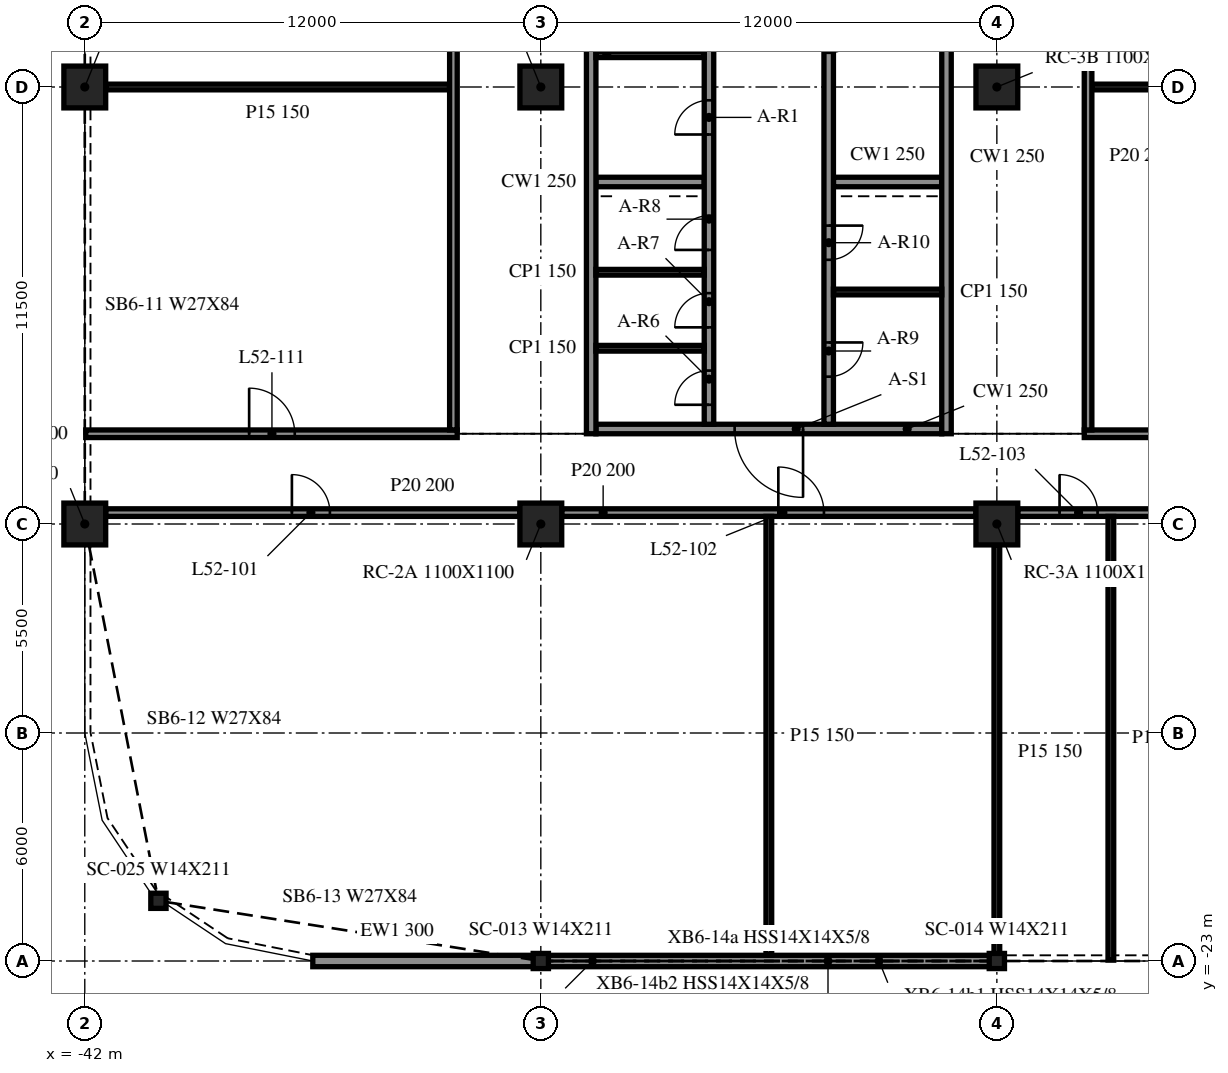
"""IFC4 building model, lengths in metres.
Left out: names, types, materials, properties, quantities, classifications, styles, units other than length and angle.
Written with IfcOpenShell. Run it as: python <this file> out.ifc"""

import sys

from ifc_helpers import new_model, si_unit, direction, frame, frame_2d, origin, origin_2d, place, context, subcontext, project, spatial, rectangle, i_section, extrude, element, fill, save


model = new_model("IFC4")
c1 = context("Model", 3, precision=1e-05, world=origin(), true_north=direction((0.0, 1.0)))
c2 = subcontext(c1, "Body", "Model", "MODEL_VIEW")
j1 = project(units=[si_unit("LENGTHUNIT", "METRE"), si_unit("PLANEANGLEUNIT", "RADIAN")], contexts=[c1])
p1 = place(None, origin())
s1 = spatial("IfcSite", under=j1, at=p1, CompositionType="ELEMENT")
p2 = place(p1, origin())
s2 = spatial("IfcBuilding", under=s1, at=p2, CompositionType="ELEMENT")
p3 = place(p2, frame((0.0, 0.0, 216.7)))
s3 = spatial("IfcBuildingStorey", under=s2, at=p3, CompositionType="ELEMENT", Elevation=216.7)
for number, where, z_axis, x_axis in (
    (1, (-42.0, -11.5, -0.34), (0.0, 0.0, 1.0), (1.0, 0.0, 0.0)),
    (2, (-42.0, 0.0, -0.34), (0.0, 0.0, 1.0), (1.0, 0.0, 0.0)),
    (3, (-30.0, -11.5, -0.34), (0.0, 0.0, 1.0), (1.0, 0.0, 0.0)),
    (4, (-30.0, 0.0, -0.34), (0.0, 0.0, 1.0), (1.0, 0.0, 0.0)),
    (5, (-18.0, -11.5, -0.34), (0.0, 0.0, 1.0), (1.0, 0.0, 0.0)),
    (6, (-18.0, 0.0, -0.34), (0.0, 0.0, 1.0), (1.0, 0.0, 0.0)),
):
    element("IfcColumn", number, at=place(p3, frame(where, z_axis=z_axis, x_axis=x_axis)), inside=s3, PredefinedType="COLUMN", context=c2, shape_type="SweptSolid", body=[
        extrude(rectangle(XDim=1.1, YDim=1.1, at=origin_2d()), origin(), (0.0, 0.0, 1.0), 3.8),
    ])
for number, where, z_axis, x_axis in (
    (7, (-40.062, -21.416, -0.34), (0.0, 0.0, 1.0), (1.0, 0.0, 0.0)),
    (8, (-30.0, -23.0, -0.34), (0.0, 0.0, 1.0), (1.0, 0.0, 0.0)),
    (9, (-18.0, -23.0, -0.34), (0.0, 0.0, 1.0), (1.0, 0.0, 0.0)),
):
    element("IfcColumn", number, at=place(p3, frame(where, z_axis=z_axis, x_axis=x_axis)), inside=s3, PredefinedType="COLUMN", context=c2, shape_type="SweptSolid", body=[
        extrude(i_section(OverallWidth=0.401, OverallDepth=0.399, WebThickness=0.025, FlangeThickness=0.04, at=origin_2d()), origin(), (0.0, 0.0, 1.0), 3.8),
    ])
p4 = place(p3, frame((-36.0, -23.0, 0.0), z_axis=(0.0, 0.0, 1.0), x_axis=(1.0, 0.0, 0.0)))
e10 = element("IfcWall", 10, at=p4, inside=s3, PredefinedType="NOTDEFINED", context=c2, shape_type="SweptSolid", body=[
    extrude(rectangle(XDim=5.988, YDim=0.3, at=frame_2d((2.994, 0.0))), origin(), (0.0, 0.0, 1.0), 2.782),
])
p5 = place(p3, frame((-29.988, -23.0, 0.0), z_axis=(0.0, 0.0, 1.0), x_axis=(1.0, 0.0, 0.0)))
e11 = element("IfcWall", 11, at=p5, inside=s3, PredefinedType="NOTDEFINED", context=c2, shape_type="SweptSolid", body=[
    extrude(rectangle(XDim=11.975, YDim=0.3, at=frame_2d((5.988, 0.0))), origin(), (0.0, 0.0, 1.0), 2.782),
])
for number, where, z_axis, x_axis in (
    (12, (-28.675, 15.125, 0.0), (0.0, 0.0, 1.0), (0.0, -1.0, 0.0)),
    (13, (-19.325, -9.125, 0.0), (0.0, 0.0, 1.0), (0.0, 1.0, 0.0)),
):
    element("IfcWall", number, at=place(p3, frame(where, z_axis=z_axis, x_axis=x_axis)), inside=s3, PredefinedType="SOLIDWALL", context=c2, shape_type="SweptSolid", body=[
        extrude(rectangle(XDim=24.25, YDim=0.25, at=frame_2d((12.125, 0.0))), origin(), (0.0, 0.0, 1.0), 3.46),
    ])
p6 = place(p3, frame((-19.45, -9.0, 0.0), z_axis=(0.0, 0.0, 1.0), x_axis=(-1.0, 0.0, 0.0)))
e14 = element("IfcWall", 14, at=p6, inside=s3, PredefinedType="SOLIDWALL", context=c2, shape_type="SweptSolid", body=[
    extrude(rectangle(XDim=9.1, YDim=0.25, at=frame_2d((4.55, 0.0))), origin(), (0.0, 0.0, 1.0), 3.46),
])
p7 = place(p6, frame((3.65, 0.0, 0.0)))
e15 = element("IfcOpeningElement", 15, at=p7, cuts=e14, PredefinedType="OPENING", context=c2, shape_type="SweptSolid", body=[
    extrude(rectangle(XDim=1.8, YDim=2.1, at=frame_2d((0.9, 1.05))), frame((0.0, 0.135, 0.0), z_axis=(0.0, -1.0, 0.0), x_axis=(1.0, 0.0, 0.0)), (0.0, 0.0, 1.0), 0.27),
])
p8 = place(p3, frame((-25.575, -8.875, 0.0), z_axis=(0.0, 0.0, 1.0), x_axis=(0.0, 1.0, 0.0)))
e16 = element("IfcWall", 16, at=p8, inside=s3, PredefinedType="SOLIDWALL", context=c2, shape_type="SweptSolid", body=[
    extrude(rectangle(XDim=17.5, YDim=0.25, at=frame_2d((8.75, 0.0))), origin(), (0.0, 0.0, 1.0), 3.46),
])
p9 = place(p8, frame((7.625, 0.0, 0.0)))
e17 = element("IfcOpeningElement", 17, at=p9, cuts=e16, PredefinedType="OPENING", context=c2, shape_type="SweptSolid", body=[
    extrude(rectangle(XDim=0.9, YDim=2.1, at=frame_2d((0.45, 1.05))), frame((0.0, 0.135, 0.0), z_axis=(0.0, -1.0, 0.0), x_axis=(1.0, 0.0, 0.0)), (0.0, 0.0, 1.0), 0.27),
])
p10 = place(p8, frame((11.425, 0.0, 0.0)))
e18 = element("IfcOpeningElement", 18, at=p10, cuts=e16, PredefinedType="OPENING", context=c2, shape_type="SweptSolid", body=[
    extrude(rectangle(XDim=0.9, YDim=2.1, at=frame_2d((0.45, 1.05))), frame((0.0, 0.135, 0.0), z_axis=(0.0, -1.0, 0.0), x_axis=(1.0, 0.0, 0.0)), (0.0, 0.0, 1.0), 0.27),
])
p11 = place(p8, frame((15.225, 0.0, 0.0)))
e19 = element("IfcOpeningElement", 19, at=p11, cuts=e16, PredefinedType="OPENING", context=c2, shape_type="SweptSolid", body=[
    extrude(rectangle(XDim=0.9, YDim=2.1, at=frame_2d((0.45, 1.05))), frame((0.0, 0.135, 0.0), z_axis=(0.0, -1.0, 0.0), x_axis=(1.0, 0.0, 0.0)), (0.0, 0.0, 1.0), 0.27),
])
p12 = place(p8, frame((0.512, 0.0, 0.0)))
e20 = element("IfcOpeningElement", 20, at=p12, cuts=e16, PredefinedType="OPENING", context=c2, shape_type="SweptSolid", body=[
    extrude(rectangle(XDim=0.9, YDim=2.1, at=frame_2d((0.45, 1.05))), frame((0.0, 0.135, 0.0), z_axis=(0.0, -1.0, 0.0), x_axis=(1.0, 0.0, 0.0)), (0.0, 0.0, 1.0), 0.27),
])
p13 = place(p8, frame((2.55, 0.0, 0.0)))
e21 = element("IfcOpeningElement", 21, at=p13, cuts=e16, PredefinedType="OPENING", context=c2, shape_type="SweptSolid", body=[
    extrude(rectangle(XDim=0.9, YDim=2.1, at=frame_2d((0.45, 1.05))), frame((0.0, 0.135, 0.0), z_axis=(0.0, -1.0, 0.0), x_axis=(1.0, 0.0, 0.0)), (0.0, 0.0, 1.0), 0.27),
])
p14 = place(p8, frame((4.587, 0.0, 0.0)))
e22 = element("IfcOpeningElement", 22, at=p14, cuts=e16, PredefinedType="OPENING", context=c2, shape_type="SweptSolid", body=[
    extrude(rectangle(XDim=0.9, YDim=2.1, at=frame_2d((0.45, 1.05))), frame((0.0, 0.135, 0.0), z_axis=(0.0, -1.0, 0.0), x_axis=(1.0, 0.0, 0.0)), (0.0, 0.0, 1.0), 0.27),
])
p15 = place(p3, frame((-22.425, 14.875, 0.0), z_axis=(0.0, 0.0, 1.0), x_axis=(0.0, -1.0, 0.0)))
e23 = element("IfcWall", 23, at=p15, inside=s3, PredefinedType="SOLIDWALL", context=c2, shape_type="SweptSolid", body=[
    extrude(rectangle(XDim=23.75, YDim=0.25, at=frame_2d((11.875, 0.0))), origin(), (0.0, 0.0, 1.0), 3.46),
])
p16 = place(p15, frame((13.075, 0.0, 0.0)))
e24 = element("IfcOpeningElement", 24, at=p16, cuts=e23, PredefinedType="OPENING", context=c2, shape_type="SweptSolid", body=[
    extrude(rectangle(XDim=0.9, YDim=2.1, at=frame_2d((0.45, 1.05))), frame((0.0, 0.135, 0.0), z_axis=(0.0, -1.0, 0.0), x_axis=(1.0, 0.0, 0.0)), (0.0, 0.0, 1.0), 0.27),
])
p17 = place(p15, frame((7.625, 0.0, 0.0)))
e25 = element("IfcOpeningElement", 25, at=p17, cuts=e23, PredefinedType="OPENING", context=c2, shape_type="SweptSolid", body=[
    extrude(rectangle(XDim=0.9, YDim=2.1, at=frame_2d((0.45, 1.05))), frame((0.0, 0.135, 0.0), z_axis=(0.0, -1.0, 0.0), x_axis=(1.0, 0.0, 0.0)), (0.0, 0.0, 1.0), 0.27),
])
p18 = place(p15, frame((21.597, 0.0, 0.0)))
e26 = element("IfcOpeningElement", 26, at=p18, cuts=e23, PredefinedType="OPENING", context=c2, shape_type="SweptSolid", body=[
    extrude(rectangle(XDim=0.9, YDim=2.1, at=frame_2d((0.45, 1.05))), frame((0.0, 0.135, 0.0), z_axis=(0.0, -1.0, 0.0), x_axis=(1.0, 0.0, 0.0)), (0.0, 0.0, 1.0), 0.27),
])
p19 = place(p15, frame((18.522, 0.0, 0.0)))
e27 = element("IfcOpeningElement", 27, at=p19, cuts=e23, PredefinedType="OPENING", context=c2, shape_type="SweptSolid", body=[
    extrude(rectangle(XDim=0.9, YDim=2.1, at=frame_2d((0.45, 1.05))), frame((0.0, 0.135, 0.0), z_axis=(0.0, -1.0, 0.0), x_axis=(1.0, 0.0, 0.0)), (0.0, 0.0, 1.0), 0.27),
])
p20 = place(p15, frame((4.087, 0.0, 0.0)))
e28 = element("IfcOpeningElement", 28, at=p20, cuts=e23, PredefinedType="OPENING", context=c2, shape_type="SweptSolid", body=[
    extrude(rectangle(XDim=0.9, YDim=2.1, at=frame_2d((0.45, 1.05))), frame((0.0, 0.135, 0.0), z_axis=(0.0, -1.0, 0.0), x_axis=(1.0, 0.0, 0.0)), (0.0, 0.0, 1.0), 0.27),
])
p21 = place(p15, frame((1.012, 0.0, 0.0)))
e29 = element("IfcOpeningElement", 29, at=p21, cuts=e23, PredefinedType="OPENING", context=c2, shape_type="SweptSolid", body=[
    extrude(rectangle(XDim=0.9, YDim=2.1, at=frame_2d((0.45, 1.05))), frame((0.0, 0.135, 0.0), z_axis=(0.0, -1.0, 0.0), x_axis=(1.0, 0.0, 0.0)), (0.0, 0.0, 1.0), 0.27),
])
for number, where, z_axis, x_axis in (
    (30, (-28.55, -2.5, 0.0), (0.0, 0.0, 1.0), (1.0, 0.0, 0.0)),
    (31, (-22.3, -2.5, 0.0), (0.0, 0.0, 1.0), (1.0, 0.0, 0.0)),
):
    element("IfcWall", number, at=place(p3, frame(where, z_axis=z_axis, x_axis=x_axis)), inside=s3, PredefinedType="SOLIDWALL", context=c2, shape_type="SweptSolid", body=[
        extrude(rectangle(XDim=2.85, YDim=0.25, at=frame_2d((1.425, 0.0))), origin(), (0.0, 0.0, 1.0), 3.46),
    ])
for number, where, z_axis, x_axis in (
    (32, (-28.55, 0.85, 0.0), (0.0, 0.0, 1.0), (1.0, 0.0, 0.0)),
    (33, (-28.55, -6.875, 0.0), (0.0, 0.0, 1.0), (1.0, 0.0, 0.0)),
    (34, (-28.55, -4.875, 0.0), (0.0, 0.0, 1.0), (1.0, 0.0, 0.0)),
    (35, (-22.3, -5.395, 0.0), (0.0, 0.0, 1.0), (1.0, 0.0, 0.0)),
):
    element("IfcWall", number, at=place(p3, frame(where, z_axis=z_axis, x_axis=x_axis)), inside=s3, PredefinedType="PARTITIONING", context=c2, shape_type="SweptSolid", body=[
        extrude(rectangle(XDim=2.85, YDim=0.15, at=frame_2d((1.425, 0.0))), origin(), (0.0, 0.0, 1.0), 3.46),
    ])
p22 = place(p3, frame((-41.45, -11.2, 0.0), z_axis=(0.0, 0.0, 1.0), x_axis=(1.0, 0.0, 0.0)))
e36 = element("IfcWall", 36, at=p22, inside=s3, PredefinedType="PARTITIONING", context=c2, shape_type="SweptSolid", body=[
    extrude(rectangle(XDim=10.9, YDim=0.2, at=frame_2d((5.45, 0.0))), origin(), (0.0, 0.0, 1.0), 3.46),
])
p23 = place(p22, frame((4.9, 0.0, 0.0)))
e37 = element("IfcOpeningElement", 37, at=p23, cuts=e36, PredefinedType="OPENING", context=c2, shape_type="SweptSolid", body=[
    extrude(rectangle(XDim=1.0, YDim=2.1, at=frame_2d((0.5, 1.05))), frame((0.0, 0.11, 0.0), z_axis=(0.0, -1.0, 0.0), x_axis=(1.0, 0.0, 0.0)), (0.0, 0.0, 1.0), 0.22),
])
p24 = place(p3, frame((-29.45, -11.2, 0.0), z_axis=(0.0, 0.0, 1.0), x_axis=(1.0, 0.0, 0.0)))
e38 = element("IfcWall", 38, at=p24, inside=s3, PredefinedType="PARTITIONING", context=c2, shape_type="SweptSolid", body=[
    extrude(rectangle(XDim=10.9, YDim=0.2, at=frame_2d((5.45, 0.0))), origin(), (0.0, 0.0, 1.0), 3.46),
])
p25 = place(p24, frame((5.7, 0.0, 0.0)))
e39 = element("IfcOpeningElement", 39, at=p25, cuts=e38, PredefinedType="OPENING", context=c2, shape_type="SweptSolid", body=[
    extrude(rectangle(XDim=1.2, YDim=2.1, at=frame_2d((0.6, 1.05))), frame((0.0, 0.11, 0.0), z_axis=(0.0, -1.0, 0.0), x_axis=(1.0, 0.0, 0.0)), (0.0, 0.0, 1.0), 0.22),
])
p26 = place(p3, frame((-17.45, -11.2, 0.0), z_axis=(0.0, 0.0, 1.0), x_axis=(1.0, 0.0, 0.0)))
e40 = element("IfcWall", 40, at=p26, inside=s3, PredefinedType="PARTITIONING", context=c2, shape_type="SweptSolid", body=[
    extrude(rectangle(XDim=10.9, YDim=0.2, at=frame_2d((5.45, 0.0))), origin(), (0.0, 0.0, 1.0), 3.46),
])
p27 = place(p26, frame((1.1, 0.0, 0.0)))
e41 = element("IfcOpeningElement", 41, at=p27, cuts=e40, PredefinedType="OPENING", context=c2, shape_type="SweptSolid", body=[
    extrude(rectangle(XDim=1.0, YDim=2.1, at=frame_2d((0.5, 1.05))), frame((0.0, 0.11, 0.0), z_axis=(0.0, -1.0, 0.0), x_axis=(1.0, 0.0, 0.0)), (0.0, 0.0, 1.0), 0.22),
])
p28 = place(p26, frame((4.9, 0.0, 0.0)))
e42 = element("IfcOpeningElement", 42, at=p28, cuts=e40, PredefinedType="OPENING", context=c2, shape_type="SweptSolid", body=[
    extrude(rectangle(XDim=1.0, YDim=2.1, at=frame_2d((0.5, 1.05))), frame((0.0, 0.11, 0.0), z_axis=(0.0, -1.0, 0.0), x_axis=(1.0, 0.0, 0.0)), (0.0, 0.0, 1.0), 0.22),
])
p29 = place(p3, frame((-41.975, -9.125, 0.0), z_axis=(0.0, 0.0, 1.0), x_axis=(1.0, 0.0, 0.0)))
e43 = element("IfcWall", 43, at=p29, inside=s3, PredefinedType="PARTITIONING", context=c2, shape_type="SweptSolid", body=[
    extrude(rectangle(XDim=9.775, YDim=0.2, at=frame_2d((4.888, 0.0))), origin(), (0.0, 0.0, 1.0), 3.46),
])
p30 = place(p29, frame((4.3, 0.0, 0.0)))
e44 = element("IfcOpeningElement", 44, at=p30, cuts=e43, PredefinedType="OPENING", context=c2, shape_type="SweptSolid", body=[
    extrude(rectangle(XDim=1.2, YDim=2.1, at=frame_2d((0.6, 1.05))), frame((0.0, 0.11, 0.0), z_axis=(0.0, -1.0, 0.0), x_axis=(1.0, 0.0, 0.0)), (0.0, 0.0, 1.0), 0.22),
])
p31 = place(p3, frame((-15.7, -9.125, 0.0), z_axis=(0.0, 0.0, 1.0), x_axis=(1.0, 0.0, 0.0)))
e45 = element("IfcWall", 45, at=p31, inside=s3, PredefinedType="PARTITIONING", context=c2, shape_type="SweptSolid", body=[
    extrude(rectangle(XDim=7.3, YDim=0.2, at=frame_2d((3.65, 0.0))), origin(), (0.0, 0.0, 1.0), 3.46),
])
p32 = place(p31, frame((3.1, 0.0, 0.0)))
e46 = element("IfcOpeningElement", 46, at=p32, cuts=e45, PredefinedType="OPENING", context=c2, shape_type="SweptSolid", body=[
    extrude(rectangle(XDim=0.9, YDim=2.1, at=frame_2d((0.45, 1.05))), frame((0.0, 0.11, 0.0), z_axis=(0.0, -1.0, 0.0), x_axis=(1.0, 0.0, 0.0)), (0.0, 0.0, 1.0), 0.22),
])
p33 = place(p3, frame((-41.45, 0.0, 0.0), z_axis=(0.0, 0.0, 1.0), x_axis=(1.0, 0.0, 0.0)))
e47 = element("IfcWall", 47, at=p33, inside=s3, PredefinedType="PARTITIONING", context=c2, shape_type="SweptSolid", body=[
    extrude(rectangle(XDim=9.05, YDim=0.15, at=frame_2d((4.525, 0.0))), origin(), (0.0, 0.0, 1.0), 3.46),
])
p34 = place(p3, frame((-15.5, 0.0, 0.0), z_axis=(0.0, 0.0, 1.0), x_axis=(1.0, 0.0, 0.0)))
e48 = element("IfcWall", 48, at=p34, inside=s3, PredefinedType="PARTITIONING", context=c2, shape_type="SweptSolid", body=[
    extrude(rectangle(XDim=6.9, YDim=0.15, at=frame_2d((3.45, 0.0))), origin(), (0.0, 0.0, 1.0), 3.46),
])
p35 = place(p3, frame((-32.3, -9.025, 0.0), z_axis=(0.0, 0.0, 1.0), x_axis=(0.0, 1.0, 0.0)))
e49 = element("IfcWall", 49, at=p35, inside=s3, PredefinedType="PARTITIONING", context=c2, shape_type="SweptSolid", body=[
    extrude(rectangle(XDim=24.05, YDim=0.2, at=frame_2d((12.025, 0.0))), origin(), (0.0, 0.0, 1.0), 3.46),
])
p36 = place(p3, frame((-24.0, -22.85, 0.0), z_axis=(0.0, 0.0, 1.0), x_axis=(0.0, 1.0, 0.0)))
e50 = element("IfcWall", 50, at=p36, inside=s3, PredefinedType="PARTITIONING", context=c2, shape_type="SweptSolid", body=[
    extrude(rectangle(XDim=11.55, YDim=0.15, at=frame_2d((5.775, 0.0))), origin(), (0.0, 0.0, 1.0), 3.46),
])
p37 = place(p3, frame((-18.0, -22.975, 0.0), z_axis=(0.0, 0.0, 1.0), x_axis=(0.0, 1.0, 0.0)))
e51 = element("IfcWall", 51, at=p37, inside=s3, PredefinedType="PARTITIONING", context=c2, shape_type="SweptSolid", body=[
    extrude(rectangle(XDim=10.925, YDim=0.15, at=frame_2d((5.462, 0.0))), origin(), (0.0, 0.0, 1.0), 3.46),
])
p38 = place(p3, frame((-15.6, -9.025, 0.0), z_axis=(0.0, 0.0, 1.0), x_axis=(0.0, 1.0, 0.0)))
e52 = element("IfcWall", 52, at=p38, inside=s3, PredefinedType="PARTITIONING", context=c2, shape_type="SweptSolid", body=[
    extrude(rectangle(XDim=24.05, YDim=0.2, at=frame_2d((12.025, 0.0))), origin(), (0.0, 0.0, 1.0), 3.46),
])
p39 = place(p38, frame((11.5, 0.0, 0.0)))
e53 = element("IfcOpeningElement", 53, at=p39, cuts=e52, PredefinedType="OPENING", context=c2, shape_type="SweptSolid", body=[
    extrude(rectangle(XDim=0.9, YDim=2.1, at=frame_2d((0.45, 1.05))), frame((0.0, 0.11, 0.0), z_axis=(0.0, -1.0, 0.0), x_axis=(1.0, 0.0, 0.0)), (0.0, 0.0, 1.0), 0.22),
])
p40 = place(p3, frame((-15.0, -22.975, 0.0), z_axis=(0.0, 0.0, 1.0), x_axis=(0.0, 1.0, 0.0)))
e54 = element("IfcWall", 54, at=p40, inside=s3, PredefinedType="PARTITIONING", context=c2, shape_type="SweptSolid", body=[
    extrude(rectangle(XDim=11.675, YDim=0.15, at=frame_2d((5.837, 0.0))), origin(), (0.0, 0.0, 1.0), 3.46),
])
p41 = place(p7, origin())
e55 = element("IfcDoor", 55, at=p41, inside=s3, OperationType="DOUBLE_DOOR_SINGLE_SWING", PredefinedType="DOOR", context=c2, shape_type="SweptSolid", body=[
    extrude(rectangle(XDim=1.8, YDim=2.1, at=frame_2d((0.9, 1.05))), frame((0.0, 0.025, 0.0), z_axis=(0.0, -1.0, 0.0), x_axis=(1.0, 0.0, 0.0)), (0.0, 0.0, 1.0), 0.05),
])
fill(e15, e55)
p42 = place(p9, origin())
e56 = element("IfcDoor", 56, at=p42, inside=s3, OperationType="SINGLE_SWING_LEFT", PredefinedType="DOOR", context=c2, shape_type="SweptSolid", body=[
    extrude(rectangle(XDim=0.9, YDim=2.1, at=frame_2d((0.45, 1.05))), frame((0.0, 0.025, 0.0), z_axis=(0.0, -1.0, 0.0), x_axis=(1.0, 0.0, 0.0)), (0.0, 0.0, 1.0), 0.05),
])
fill(e17, e56)
p43 = place(p16, origin())
e57 = element("IfcDoor", 57, at=p43, inside=s3, OperationType="SINGLE_SWING_RIGHT", PredefinedType="DOOR", context=c2, shape_type="SweptSolid", body=[
    extrude(rectangle(XDim=0.9, YDim=2.1, at=frame_2d((0.45, 1.05))), frame((0.0, 0.025, 0.0), z_axis=(0.0, -1.0, 0.0), x_axis=(1.0, 0.0, 0.0)), (0.0, 0.0, 1.0), 0.05),
])
fill(e24, e57)
p44 = place(p12, origin())
e58 = element("IfcDoor", 58, at=p44, inside=s3, OperationType="SINGLE_SWING_RIGHT", PredefinedType="DOOR", context=c2, shape_type="SweptSolid", body=[
    extrude(rectangle(XDim=0.9, YDim=2.1, at=frame_2d((0.45, 1.05))), frame((0.0, 0.025, 0.0), z_axis=(0.0, -1.0, 0.0), x_axis=(1.0, 0.0, 0.0)), (0.0, 0.0, 1.0), 0.05),
])
fill(e20, e58)
p45 = place(p13, origin())
e59 = element("IfcDoor", 59, at=p45, inside=s3, OperationType="SINGLE_SWING_LEFT", PredefinedType="DOOR", context=c2, shape_type="SweptSolid", body=[
    extrude(rectangle(XDim=0.9, YDim=2.1, at=frame_2d((0.45, 1.05))), frame((0.0, 0.025, 0.0), z_axis=(0.0, -1.0, 0.0), x_axis=(1.0, 0.0, 0.0)), (0.0, 0.0, 1.0), 0.05),
])
fill(e21, e59)
p46 = place(p14, origin())
e60 = element("IfcDoor", 60, at=p46, inside=s3, OperationType="SINGLE_SWING_RIGHT", PredefinedType="DOOR", context=c2, shape_type="SweptSolid", body=[
    extrude(rectangle(XDim=0.9, YDim=2.1, at=frame_2d((0.45, 1.05))), frame((0.0, 0.025, 0.0), z_axis=(0.0, -1.0, 0.0), x_axis=(1.0, 0.0, 0.0)), (0.0, 0.0, 1.0), 0.05),
])
fill(e22, e60)
p47 = place(p18, origin())
e61 = element("IfcDoor", 61, at=p47, inside=s3, OperationType="SINGLE_SWING_LEFT", PredefinedType="DOOR", context=c2, shape_type="SweptSolid", body=[
    extrude(rectangle(XDim=0.9, YDim=2.1, at=frame_2d((0.45, 1.05))), frame((0.0, 0.025, 0.0), z_axis=(0.0, -1.0, 0.0), x_axis=(1.0, 0.0, 0.0)), (0.0, 0.0, 1.0), 0.05),
])
fill(e26, e61)
p48 = place(p19, origin())
e62 = element("IfcDoor", 62, at=p48, inside=s3, OperationType="SINGLE_SWING_RIGHT", PredefinedType="DOOR", context=c2, shape_type="SweptSolid", body=[
    extrude(rectangle(XDim=0.9, YDim=2.1, at=frame_2d((0.45, 1.05))), frame((0.0, 0.025, 0.0), z_axis=(0.0, -1.0, 0.0), x_axis=(1.0, 0.0, 0.0)), (0.0, 0.0, 1.0), 0.05),
])
fill(e27, e62)
p49 = place(p23, origin())
e63 = element("IfcDoor", 63, at=p49, inside=s3, OperationType="SINGLE_SWING_RIGHT", PredefinedType="DOOR", context=c2, shape_type="SweptSolid", body=[
    extrude(rectangle(XDim=1.0, YDim=2.1, at=frame_2d((0.5, 1.05))), frame((0.0, 0.025, 0.0), z_axis=(0.0, -1.0, 0.0), x_axis=(1.0, 0.0, 0.0)), (0.0, 0.0, 1.0), 0.05),
])
fill(e37, e63)
p50 = place(p25, origin())
e64 = element("IfcDoor", 64, at=p50, inside=s3, OperationType="SINGLE_SWING_LEFT", PredefinedType="DOOR", context=c2, shape_type="SweptSolid", body=[
    extrude(rectangle(XDim=1.2, YDim=2.1, at=frame_2d((0.6, 1.05))), frame((0.0, 0.025, 0.0), z_axis=(0.0, -1.0, 0.0), x_axis=(1.0, 0.0, 0.0)), (0.0, 0.0, 1.0), 0.05),
])
fill(e39, e64)
p51 = place(p27, origin())
e65 = element("IfcDoor", 65, at=p51, inside=s3, OperationType="SINGLE_SWING_RIGHT", PredefinedType="DOOR", context=c2, shape_type="SweptSolid", body=[
    extrude(rectangle(XDim=1.0, YDim=2.1, at=frame_2d((0.5, 1.05))), frame((0.0, 0.025, 0.0), z_axis=(0.0, -1.0, 0.0), x_axis=(1.0, 0.0, 0.0)), (0.0, 0.0, 1.0), 0.05),
])
fill(e41, e65)
p52 = place(p30, origin())
e66 = element("IfcDoor", 66, at=p52, inside=s3, OperationType="SINGLE_SWING_RIGHT", PredefinedType="DOOR", context=c2, shape_type="SweptSolid", body=[
    extrude(rectangle(XDim=1.2, YDim=2.1, at=frame_2d((0.6, 1.05))), frame((0.0, 0.025, 0.0), z_axis=(0.0, -1.0, 0.0), x_axis=(1.0, 0.0, 0.0)), (0.0, 0.0, 1.0), 0.05),
])
fill(e44, e66)
save(model, sys.argv[1])
